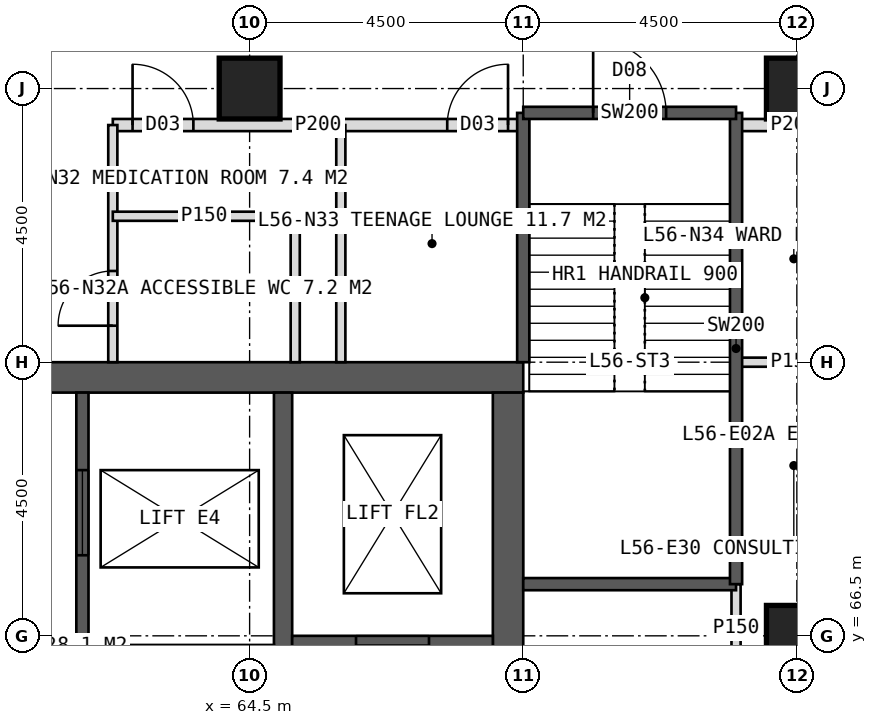
"""IFC4 building model, lengths in metres.
Left out: names, types, materials, properties, quantities, classifications, styles, units other than length and angle.
Written with IfcOpenShell. Run it as: python <this file> out.ifc"""

import sys

from ifc_helpers import new_model, si_unit, direction, frame, frame_2d, origin, origin_2d, place, context, subcontext, project, spatial, rectangle, hollow_rectangle, extrude, element, fill, save


model = new_model("IFC4")
c1 = context("Model", 3, precision=1e-05, world=origin(), true_north=direction((0.0, 1.0)))
c2 = subcontext(c1, "Body", "Model", "MODEL_VIEW")
j1 = project(units=[si_unit("LENGTHUNIT", "METRE"), si_unit("PLANEANGLEUNIT", "RADIAN")], contexts=[c1])
p1 = place(None, origin())
s1 = spatial("IfcSite", under=j1, at=p1, CompositionType="ELEMENT")
p2 = place(p1, origin())
s2 = spatial("IfcBuilding", under=s1, at=p2, CompositionType="ELEMENT")
p3 = place(p2, frame((0.0, 0.0, 233.0)))
s3 = spatial("IfcBuildingStorey", under=s2, at=p3, CompositionType="ELEMENT", Elevation=233.0)
p4 = place(p3, frame((51.0, 70.75, 0.0), z_axis=(0.0, 0.0, 1.0), x_axis=(1.0, 0.0, 0.0)))
e1 = element("IfcWall", 1, at=p4, inside=s3, PredefinedType="SHEAR", context=c2, shape_type="SweptSolid", body=[
    extrude(rectangle(XDim=18.0, YDim=0.5, at=frame_2d((9.0, 0.0))), origin(), (0.0, 0.0, 1.0), 4.0),
])
p5 = place(p4, frame((8.1, 0.0, 0.0)))
e2 = element("IfcOpeningElement", 2, at=p5, cuts=e1, PredefinedType="OPENING", context=c2, shape_type="SweptSolid", body=[
    extrude(rectangle(XDim=1.8, YDim=2.2, at=frame_2d((0.9, 1.1))), frame((0.0, 0.26, 0.0), z_axis=(0.0, -1.0, 0.0), x_axis=(1.0, 0.0, 0.0)), (0.0, 0.0, 1.0), 0.52),
])
p6 = place(p3, frame((68.75, 53.5, 0.0), z_axis=(0.0, 0.0, 1.0), x_axis=(0.0, 1.0, 0.0)))
e3 = element("IfcWall", 3, at=p6, inside=s3, PredefinedType="SHEAR", context=c2, shape_type="SweptSolid", body=[
    extrude(rectangle(XDim=17.0, YDim=0.5, at=frame_2d((8.5, 0.0))), origin(), (0.0, 0.0, 1.0), 4.0),
])
p7 = place(p6, frame((9.6, 0.0, 0.0)))
e4 = element("IfcOpeningElement", 4, at=p7, cuts=e3, PredefinedType="OPENING", context=c2, shape_type="SweptSolid", body=[
    extrude(rectangle(XDim=1.5, YDim=2.2, at=frame_2d((0.75, 1.1))), frame((0.0, 0.26, 0.0), z_axis=(0.0, -1.0, 0.0), x_axis=(1.0, 0.0, 0.0)), (0.0, 0.0, 1.0), 0.52),
])
p8 = place(p3, frame((65.05, 53.5, 0.0), z_axis=(0.0, 0.0, 1.0), x_axis=(0.0, 1.0, 0.0)))
e5 = element("IfcWall", 5, at=p8, inside=s3, PredefinedType="SHEAR", context=c2, shape_type="SweptSolid", body=[
    extrude(rectangle(XDim=17.0, YDim=0.3, at=frame_2d((8.5, 0.0))), origin(), (0.0, 0.0, 1.0), 4.0),
])
p9 = place(p3, frame((61.75, 53.5, 0.0), z_axis=(0.0, 0.0, 1.0), x_axis=(0.0, 1.0, 0.0)))
e6 = element("IfcWall", 6, at=p9, inside=s3, PredefinedType="SHEAR", context=c2, shape_type="SweptSolid", body=[
    extrude(rectangle(XDim=17.0, YDim=0.2, at=frame_2d((8.5, 0.0))), origin(), (0.0, 0.0, 1.0), 4.0),
])
p10 = place(p9, frame((0.6, 0.0, 0.0)))
e7 = element("IfcOpeningElement", 7, at=p10, cuts=e6, PredefinedType="OPENING", context=c2, shape_type="SweptSolid", body=[
    extrude(rectangle(XDim=1.0, YDim=2.1, at=frame_2d((0.5, 1.05))), frame((0.0, 0.11, 0.0), z_axis=(0.0, -1.0, 0.0), x_axis=(1.0, 0.0, 0.0)), (0.0, 0.0, 1.0), 0.22),
])
p11 = place(p9, frame((2.75, 0.0, 0.0)))
e8 = element("IfcOpeningElement", 8, at=p11, cuts=e6, PredefinedType="OPENING", context=c2, shape_type="SweptSolid", body=[
    extrude(rectangle(XDim=1.0, YDim=2.1, at=frame_2d((0.5, 1.05))), frame((0.0, 0.11, 0.0), z_axis=(0.0, -1.0, 0.0), x_axis=(1.0, 0.0, 0.0)), (0.0, 0.0, 1.0), 0.22),
])
p12 = place(p9, frame((4.824, 0.0, 0.0)))
e9 = element("IfcOpeningElement", 9, at=p12, cuts=e6, PredefinedType="OPENING", context=c2, shape_type="SweptSolid", body=[
    extrude(rectangle(XDim=1.0, YDim=2.1, at=frame_2d((0.5, 1.05))), frame((0.0, 0.11, 0.0), z_axis=(0.0, -1.0, 0.0), x_axis=(1.0, 0.0, 0.0)), (0.0, 0.0, 1.0), 0.22),
])
p13 = place(p9, frame((6.924, 0.0, 0.0)))
e10 = element("IfcOpeningElement", 10, at=p13, cuts=e6, PredefinedType="OPENING", context=c2, shape_type="SweptSolid", body=[
    extrude(rectangle(XDim=1.0, YDim=2.1, at=frame_2d((0.5, 1.05))), frame((0.0, 0.11, 0.0), z_axis=(0.0, -1.0, 0.0), x_axis=(1.0, 0.0, 0.0)), (0.0, 0.0, 1.0), 0.22),
])
p14 = place(p9, frame((10.025, 0.0, 0.0)))
e11 = element("IfcOpeningElement", 11, at=p14, cuts=e6, PredefinedType="OPENING", context=c2, shape_type="SweptSolid", body=[
    extrude(rectangle(XDim=1.4, YDim=2.2, at=frame_2d((0.7, 1.1))), frame((0.0, 0.11, 0.0), z_axis=(0.0, -1.0, 0.0), x_axis=(1.0, 0.0, 0.0)), (0.0, 0.0, 1.0), 0.22),
])
p15 = place(p9, frame((14.325, 0.0, 0.0)))
e12 = element("IfcOpeningElement", 12, at=p15, cuts=e6, PredefinedType="OPENING", context=c2, shape_type="SweptSolid", body=[
    extrude(rectangle(XDim=1.4, YDim=2.2, at=frame_2d((0.7, 1.1))), frame((0.0, 0.11, 0.0), z_axis=(0.0, -1.0, 0.0), x_axis=(1.0, 0.0, 0.0)), (0.0, 0.0, 1.0), 0.22),
])
p16 = place(p3, frame((65.2, 66.35, 0.0), z_axis=(0.0, 0.0, 1.0), x_axis=(1.0, 0.0, 0.0)))
e13 = element("IfcWall", 13, at=p16, inside=s3, PredefinedType="SHEAR", context=c2, shape_type="SweptSolid", body=[
    extrude(rectangle(XDim=3.3, YDim=0.3, at=frame_2d((1.65, 0.0))), origin(), (0.0, 0.0, 1.0), 4.0),
])
p17 = place(p16, frame((1.05, 0.0, 0.0)))
e14 = element("IfcOpeningElement", 14, at=p17, cuts=e13, PredefinedType="OPENING", context=c2, shape_type="SweptSolid", body=[
    extrude(rectangle(XDim=1.2, YDim=2.2, at=frame_2d((0.6, 1.1))), frame((0.0, 0.16, 0.0), z_axis=(0.0, -1.0, 0.0), x_axis=(1.0, 0.0, 0.0)), (0.0, 0.0, 1.0), 0.32),
])
for number, where, z_axis, x_axis in (
    (15, (73.5, 75.5, 0.0), (0.0, 0.0, 1.0), (1.0, 0.0, 0.0)),
    (16, (64.5, 75.5, 0.0), (0.0, 0.0, 1.0), (1.0, 0.0, 0.0)),
    (17, (73.5, 66.5, 0.0), (0.0, 0.0, 1.0), (1.0, 0.0, 0.0)),
):
    element("IfcColumn", number, at=place(p3, frame(where, z_axis=z_axis, x_axis=x_axis)), inside=s3, PredefinedType="COLUMN", context=c2, shape_type="SweptSolid", body=[
        extrude(hollow_rectangle(XDim=1.0, YDim=1.0, WallThickness=0.1, at=origin_2d()), origin(), (0.0, 0.0, 1.0), 4.0),
    ])
p18 = place(p3, frame((62.25, 74.9, 0.0), z_axis=(0.0, 0.0, 1.0), x_axis=(1.0, 0.0, 0.0)))
e18 = element("IfcWall", 18, at=p18, inside=s3, PredefinedType="PARTITIONING", context=c2, shape_type="SweptSolid", body=[
    extrude(rectangle(XDim=6.75, YDim=0.2, at=frame_2d((3.375, 0.0))), origin(), (0.0, 0.0, 1.0), 3.75),
])
p19 = place(p18, frame((0.325, 0.0, 0.0)))
e19 = element("IfcOpeningElement", 19, at=p19, cuts=e18, PredefinedType="OPENING", context=c2, shape_type="SweptSolid", body=[
    extrude(rectangle(XDim=1.0, YDim=2.1, at=frame_2d((0.5, 1.05))), frame((0.0, 0.11, 0.0), z_axis=(0.0, -1.0, 0.0), x_axis=(1.0, 0.0, 0.0)), (0.0, 0.0, 1.0), 0.22),
])
p20 = place(p18, frame((5.5, 0.0, 0.0)))
e20 = element("IfcOpeningElement", 20, at=p20, cuts=e18, PredefinedType="OPENING", context=c2, shape_type="SweptSolid", body=[
    extrude(rectangle(XDim=1.0, YDim=2.1, at=frame_2d((0.5, 1.05))), frame((0.0, 0.11, 0.0), z_axis=(0.0, -1.0, 0.0), x_axis=(1.0, 0.0, 0.0)), (0.0, 0.0, 1.0), 0.22),
])
p21 = place(p3, frame((72.5, 74.9, 0.0), z_axis=(0.0, 0.0, 1.0), x_axis=(1.0, 0.0, 0.0)))
e21 = element("IfcWall", 21, at=p21, inside=s3, PredefinedType="PARTITIONING", context=c2, shape_type="SweptSolid", body=[
    extrude(rectangle(XDim=1.9, YDim=0.2, at=frame_2d((0.95, 0.0))), origin(), (0.0, 0.0, 1.0), 3.75),
])
p22 = place(p3, frame((62.25, 71.0, 0.0), z_axis=(0.0, 0.0, 1.0), x_axis=(0.0, 1.0, 0.0)))
e22 = element("IfcWall", 22, at=p22, inside=s3, PredefinedType="PARTITIONING", context=c2, shape_type="SweptSolid", body=[
    extrude(rectangle(XDim=3.9, YDim=0.15, at=frame_2d((1.95, 0.0))), origin(), (0.0, 0.0, 1.0), 3.75),
])
p23 = place(p22, frame((0.6, 0.0, 0.0)))
e23 = element("IfcOpeningElement", 23, at=p23, cuts=e22, PredefinedType="OPENING", context=c2, shape_type="SweptSolid", body=[
    extrude(rectangle(XDim=0.9, YDim=2.1, at=frame_2d((0.45, 1.05))), frame((0.0, 0.085, 0.0), z_axis=(0.0, -1.0, 0.0), x_axis=(1.0, 0.0, 0.0)), (0.0, 0.0, 1.0), 0.17),
])
p24 = place(p3, frame((66.0, 71.0, 0.0), z_axis=(0.0, 0.0, 1.0), x_axis=(0.0, 1.0, 0.0)))
e24 = element("IfcWall", 24, at=p24, inside=s3, PredefinedType="PARTITIONING", context=c2, shape_type="SweptSolid", body=[
    extrude(rectangle(XDim=3.9, YDim=0.15, at=frame_2d((1.95, 0.0))), origin(), (0.0, 0.0, 1.0), 3.75),
])
p25 = place(p3, frame((62.25, 73.4, 0.0), z_axis=(0.0, 0.0, 1.0), x_axis=(1.0, 0.0, 0.0)))
e25 = element("IfcWall", 25, at=p25, inside=s3, PredefinedType="PARTITIONING", context=c2, shape_type="SweptSolid", body=[
    extrude(rectangle(XDim=3.0, YDim=0.15, at=frame_2d((1.5, 0.0))), origin(), (0.0, 0.0, 1.0), 3.75),
])
p26 = place(p3, frame((65.25, 71.0, 0.0), z_axis=(0.0, 0.0, 1.0), x_axis=(0.0, 1.0, 0.0)))
e26 = element("IfcWall", 26, at=p26, inside=s3, PredefinedType="PARTITIONING", context=c2, shape_type="SweptSolid", body=[
    extrude(rectangle(XDim=2.4, YDim=0.15, at=frame_2d((1.2, 0.0))), origin(), (0.0, 0.0, 1.0), 3.75),
])
p27 = place(p3, frame((72.5, 71.0, 0.0), z_axis=(0.0, 0.0, 1.0), x_axis=(1.0, 0.0, 0.0)))
e27 = element("IfcWall", 27, at=p27, inside=s3, PredefinedType="PARTITIONING", context=c2, shape_type="SweptSolid", body=[
    extrude(rectangle(XDim=1.9, YDim=0.15, at=frame_2d((0.95, 0.0))), origin(), (0.0, 0.0, 1.0), 3.75),
])
p28 = place(p3, frame((72.5, 65.9, 0.0), z_axis=(0.0, 0.0, 1.0), x_axis=(0.0, 1.0, 0.0)))
e28 = element("IfcWall", 28, at=p28, inside=s3, PredefinedType="PARTITIONING", context=c2, shape_type="SweptSolid", body=[
    extrude(rectangle(XDim=1.45, YDim=0.15, at=frame_2d((0.725, 0.0))), origin(), (0.0, 0.0, 1.0), 3.75),
])
p29 = place(p3, frame((69.0, 71.0, 0.0), z_axis=(0.0, 0.0, 1.0), x_axis=(0.0, 1.0, 0.0)))
e29 = element("IfcWall", 29, at=p29, inside=s3, PredefinedType="SOLIDWALL", context=c2, shape_type="SweptSolid", body=[
    extrude(rectangle(XDim=4.1, YDim=0.2, at=frame_2d((2.05, 0.0))), origin(), (0.0, 0.0, 1.0), 3.75),
])
p30 = place(p3, frame((69.0, 67.35, 0.0), z_axis=(0.0, 0.0, 1.0), x_axis=(1.0, 0.0, 0.0)))
e30 = element("IfcWall", 30, at=p30, inside=s3, PredefinedType="SOLIDWALL", context=c2, shape_type="SweptSolid", body=[
    extrude(rectangle(XDim=3.5, YDim=0.2, at=frame_2d((1.75, 0.0))), origin(), (0.0, 0.0, 1.0), 3.75),
])
p31 = place(p3, frame((72.5, 67.35, 0.0), z_axis=(0.0, 0.0, 1.0), x_axis=(0.0, 1.0, 0.0)))
e31 = element("IfcWall", 31, at=p31, inside=s3, PredefinedType="SOLIDWALL", context=c2, shape_type="SweptSolid", body=[
    extrude(rectangle(XDim=7.75, YDim=0.2, at=frame_2d((3.875, 0.0))), origin(), (0.0, 0.0, 1.0), 3.75),
])
p32 = place(p3, frame((69.0, 75.1, 0.0), z_axis=(0.0, 0.0, 1.0), x_axis=(1.0, 0.0, 0.0)))
e32 = element("IfcWall", 32, at=p32, inside=s3, PredefinedType="SOLIDWALL", context=c2, shape_type="SweptSolid", body=[
    extrude(rectangle(XDim=3.5, YDim=0.2, at=frame_2d((1.75, 0.0))), origin(), (0.0, 0.0, 1.0), 3.75),
])
p33 = place(p32, frame((1.15, 0.0, 0.0)))
e33 = element("IfcOpeningElement", 33, at=p33, cuts=e32, PredefinedType="OPENING", context=c2, shape_type="SweptSolid", body=[
    extrude(rectangle(XDim=1.2, YDim=2.1, at=frame_2d((0.6, 1.05))), frame((0.0, 0.11, 0.0), z_axis=(0.0, -1.0, 0.0), x_axis=(1.0, 0.0, 0.0)), (0.0, 0.0, 1.0), 0.22),
])
p34 = place(p23, origin())
e34 = element("IfcDoor", 34, at=p34, inside=s3, OperationType="SINGLE_SWING_LEFT", PredefinedType="DOOR", context=c2, shape_type="SweptSolid", body=[
    extrude(rectangle(XDim=0.9, YDim=2.1, at=frame_2d((0.45, 1.05))), frame((0.0, 0.025, 0.0), z_axis=(0.0, -1.0, 0.0), x_axis=(1.0, 0.0, 0.0)), (0.0, 0.0, 1.0), 0.05),
])
fill(e23, e34)
p35 = place(p19, origin())
e35 = element("IfcDoor", 35, at=p35, inside=s3, OperationType="SINGLE_SWING_LEFT", PredefinedType="DOOR", context=c2, shape_type="SweptSolid", body=[
    extrude(rectangle(XDim=1.0, YDim=2.1, at=frame_2d((0.5, 1.05))), frame((0.0, 0.025, 0.0), z_axis=(0.0, -1.0, 0.0), x_axis=(1.0, 0.0, 0.0)), (0.0, 0.0, 1.0), 0.05),
])
fill(e19, e35)
p36 = place(p20, origin())
e36 = element("IfcDoor", 36, at=p36, inside=s3, OperationType="SINGLE_SWING_RIGHT", PredefinedType="DOOR", context=c2, shape_type="SweptSolid", body=[
    extrude(rectangle(XDim=1.0, YDim=2.1, at=frame_2d((0.5, 1.05))), frame((0.0, 0.025, 0.0), z_axis=(0.0, -1.0, 0.0), x_axis=(1.0, 0.0, 0.0)), (0.0, 0.0, 1.0), 0.05),
])
fill(e20, e36)
p37 = place(p17, origin())
e37 = element("IfcDoor", 37, at=p37, inside=s3, OperationType="SLIDING_TO_LEFT", PredefinedType="DOOR", context=c2, shape_type="SweptSolid", body=[
    extrude(rectangle(XDim=1.2, YDim=2.2, at=frame_2d((0.6, 1.1))), frame((0.0, 0.025, 0.0), z_axis=(0.0, -1.0, 0.0), x_axis=(1.0, 0.0, 0.0)), (0.0, 0.0, 1.0), 0.05),
])
fill(e14, e37)
p38 = place(p15, origin())
e38 = element("IfcDoor", 38, at=p38, inside=s3, OperationType="SLIDING_TO_LEFT", PredefinedType="DOOR", context=c2, shape_type="SweptSolid", body=[
    extrude(rectangle(XDim=1.4, YDim=2.2, at=frame_2d((0.7, 1.1))), frame((0.0, 0.025, 0.0), z_axis=(0.0, -1.0, 0.0), x_axis=(1.0, 0.0, 0.0)), (0.0, 0.0, 1.0), 0.05),
])
fill(e12, e38)
p39 = place(p33, origin())
e39 = element("IfcDoor", 39, at=p39, inside=s3, OperationType="SINGLE_SWING_LEFT", PredefinedType="DOOR", context=c2, shape_type="SweptSolid", body=[
    extrude(rectangle(XDim=1.2, YDim=2.1, at=frame_2d((0.6, 1.05))), frame((0.0, 0.025, 0.0), z_axis=(0.0, -1.0, 0.0), x_axis=(1.0, 0.0, 0.0)), (0.0, 0.0, 1.0), 0.05),
])
fill(e33, e39)
save(model, sys.argv[1])
